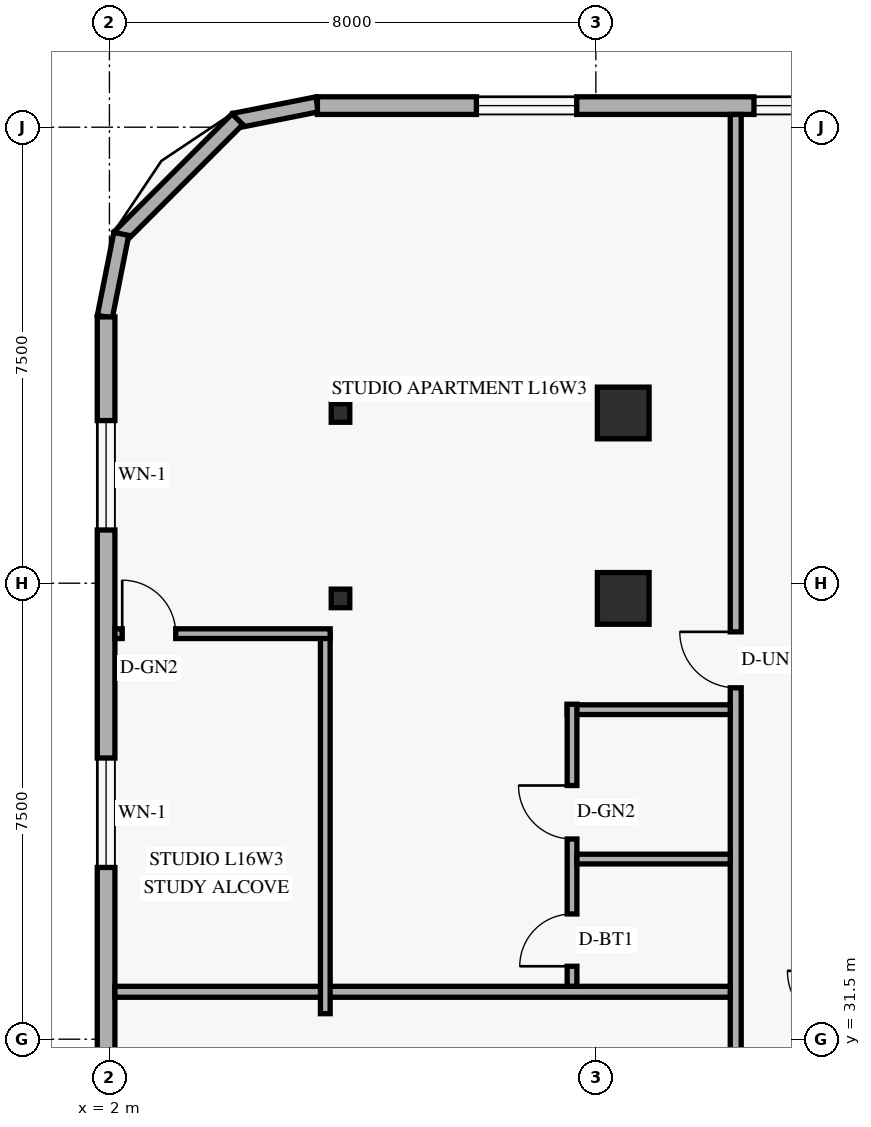
"""IFC4 building model, lengths in metres.
Left out: names, types, materials, properties, quantities, classifications, styles, units other than length and angle.
Written with IfcOpenShell. Run it as: python <this file> out.ifc"""

import sys

from ifc_helpers import new_model, si_unit, direction, frame, frame_2d, origin, origin_2d, place, context, subcontext, project, spatial, rectangle, hollow_rectangle, extrude, element, fill, save


model = new_model("IFC4")
c1 = context("Model", 3, precision=1e-05, world=origin(), true_north=direction((0.0, 1.0)))
c2 = subcontext(c1, "Body", "Model", "MODEL_VIEW")
j1 = project(units=[si_unit("LENGTHUNIT", "METRE"), si_unit("PLANEANGLEUNIT", "RADIAN")], contexts=[c1])
p1 = place(None, origin())
s1 = spatial("IfcSite", under=j1, at=p1, CompositionType="ELEMENT")
p2 = place(p1, origin())
s2 = spatial("IfcBuilding", under=s1, at=p2, CompositionType="ELEMENT")
p3 = place(p2, frame((0.0, 0.0, 64.2)))
s3 = spatial("IfcBuildingStorey", under=s2, at=p3, CompositionType="ELEMENT", Elevation=64.2)
for number, where, z_axis, x_axis in (
    (1, (5.8, 38.75, 0.0), (0.0, 0.0, 1.0), (1.0, 0.0, 0.0)),
    (2, (5.8, 41.8, 0.0), (0.0, 0.0, 1.0), (1.0, 0.0, 0.0)),
):
    element("IfcColumn", number, at=place(p3, frame(where, z_axis=z_axis, x_axis=x_axis)), inside=s3, PredefinedType="COLUMN", context=c2, shape_type="SweptSolid", body=[
        extrude(hollow_rectangle(XDim=0.305, YDim=0.305, WallThickness=0.013, at=origin_2d()), origin(), (0.0, 0.0, 1.0), 3.6),
    ])
for number, where, z_axis, x_axis in (
    (3, (10.45, 38.75, 0.0), (0.0, 0.0, 1.0), (1.0, 0.0, 0.0)),
    (4, (10.45, 41.8, 0.0), (0.0, 0.0, 1.0), (1.0, 0.0, 0.0)),
):
    element("IfcColumn", number, at=place(p3, frame(where, z_axis=z_axis, x_axis=x_axis)), inside=s3, PredefinedType="COLUMN", context=c2, shape_type="SweptSolid", body=[
        extrude(rectangle(XDim=0.85, YDim=0.85, at=origin_2d()), origin(), (0.0, 0.0, 1.0), 3.6),
    ])
p4 = place(p3, frame((5.417, 46.876, 0.0), z_axis=(0.0, 0.0, 1.0), x_axis=(-0.980809899341, -0.19496651342, 0.0)))
e5 = element("IfcWall", 5, at=p4, inside=s3, PredefinedType="SOLIDWALL", context=c2, shape_type="SweptSolid", body=[
    extrude(rectangle(XDim=1.389, YDim=0.25, at=frame_2d((0.694, 0.0))), origin(), (0.0, 0.0, 1.0), 3.36),
])
p5 = place(p3, frame((4.105, 46.632, 0.0), z_axis=(0.0, 0.0, 1.0), x_axis=(-0.707106781187, -0.707106781187, 0.0)))
e6 = element("IfcWall", 6, at=p5, inside=s3, PredefinedType="SOLIDWALL", context=c2, shape_type="SweptSolid", body=[
    extrude(rectangle(XDim=2.739, YDim=0.25, at=frame_2d((1.37, 0.0))), origin(), (0.0, 0.0, 1.0), 3.36),
])
p6 = place(p3, frame((2.195, 44.746, 0.0), z_axis=(0.0, 0.0, 1.0), x_axis=(-0.19496651342, -0.980809899341, 0.0)))
e7 = element("IfcWall", 7, at=p6, inside=s3, PredefinedType="SOLIDWALL", context=c2, shape_type="SweptSolid", body=[
    extrude(rectangle(XDim=1.389, YDim=0.25, at=frame_2d((0.694, 0.0))), origin(), (0.0, 0.0, 1.0), 3.36),
])
p7 = place(p3, frame((44.98, 46.855, 0.0), z_axis=(0.0, 0.0, 1.0), x_axis=(-1.0, 0.0, 0.0)))
e8 = element("IfcWall", 8, at=p7, inside=s3, PredefinedType="SOLIDWALL", context=c2, shape_type="SweptSolid", body=[
    extrude(rectangle(XDim=39.56, YDim=0.29, at=frame_2d((19.78, 0.0))), origin(), (0.0, 0.0, 1.0), 3.36),
])
p8 = place(p7, frame((35.295, 0.0, 0.85)))
e9 = element("IfcOpeningElement", 9, at=p8, cuts=e8, PredefinedType="OPENING", context=c2, shape_type="SweptSolid", body=[
    extrude(rectangle(XDim=1.65, YDim=1.6, at=frame_2d((0.825, 0.8))), frame((0.0, 0.155, 0.0), z_axis=(0.0, -1.0, 0.0), x_axis=(1.0, 0.0, 0.0)), (0.0, 0.0, 1.0), 0.31),
])
p9 = place(p7, frame((31.18, 0.0, 0.85)))
e10 = element("IfcOpeningElement", 10, at=p9, cuts=e8, PredefinedType="OPENING", context=c2, shape_type="SweptSolid", body=[
    extrude(rectangle(XDim=1.2, YDim=1.5, at=frame_2d((0.6, 0.75))), frame((0.0, 0.155, 0.0), z_axis=(0.0, -1.0, 0.0), x_axis=(1.0, 0.0, 0.0)), (0.0, 0.0, 1.0), 0.31),
])
p10 = place(p7, frame((25.684, 0.0, 0.85)))
e11 = element("IfcOpeningElement", 11, at=p10, cuts=e8, PredefinedType="OPENING", context=c2, shape_type="SweptSolid", body=[
    extrude(rectangle(XDim=1.65, YDim=1.6, at=frame_2d((0.825, 0.8))), frame((0.0, 0.155, 0.0), z_axis=(0.0, -1.0, 0.0), x_axis=(1.0, 0.0, 0.0)), (0.0, 0.0, 1.0), 0.31),
])
p11 = place(p7, frame((18.649, 0.0, 0.85)))
e12 = element("IfcOpeningElement", 12, at=p11, cuts=e8, PredefinedType="OPENING", context=c2, shape_type="SweptSolid", body=[
    extrude(rectangle(XDim=1.65, YDim=1.6, at=frame_2d((0.825, 0.8))), frame((0.0, 0.155, 0.0), z_axis=(0.0, -1.0, 0.0), x_axis=(1.0, 0.0, 0.0)), (0.0, 0.0, 1.0), 0.31),
])
p12 = place(p7, frame((12.359, 0.0, 0.85)))
e13 = element("IfcOpeningElement", 13, at=p12, cuts=e8, PredefinedType="OPENING", context=c2, shape_type="SweptSolid", body=[
    extrude(rectangle(XDim=1.65, YDim=1.6, at=frame_2d((0.825, 0.8))), frame((0.0, 0.155, 0.0), z_axis=(0.0, -1.0, 0.0), x_axis=(1.0, 0.0, 0.0)), (0.0, 0.0, 1.0), 0.31),
])
p13 = place(p7, frame((7.895, 0.0, 0.85)))
e14 = element("IfcOpeningElement", 14, at=p13, cuts=e8, PredefinedType="OPENING", context=c2, shape_type="SweptSolid", body=[
    extrude(rectangle(XDim=1.2, YDim=1.5, at=frame_2d((0.6, 0.75))), frame((0.0, 0.155, 0.0), z_axis=(0.0, -1.0, 0.0), x_axis=(1.0, 0.0, 0.0)), (0.0, 0.0, 1.0), 0.31),
])
p14 = place(p7, frame((2.89, 0.0, 0.85)))
e15 = element("IfcOpeningElement", 15, at=p14, cuts=e8, PredefinedType="OPENING", context=c2, shape_type="SweptSolid", body=[
    extrude(rectangle(XDim=1.65, YDim=1.6, at=frame_2d((0.825, 0.8))), frame((0.0, 0.155, 0.0), z_axis=(0.0, -1.0, 0.0), x_axis=(1.0, 0.0, 0.0)), (0.0, 0.0, 1.0), 0.31),
])
p15 = place(p3, frame((1.945, 43.38, 0.0), z_axis=(0.0, 0.0, 1.0), x_axis=(0.0, -1.0, 0.0)))
e16 = element("IfcWall", 16, at=p15, inside=s3, PredefinedType="SOLIDWALL", context=c2, shape_type="SweptSolid", body=[
    extrude(rectangle(XDim=38.76, YDim=0.29, at=frame_2d((19.38, 0.0))), origin(), (0.0, 0.0, 1.0), 3.36),
])
p16 = place(p15, frame((31.85, 0.0, 0.85)))
e17 = element("IfcOpeningElement", 17, at=p16, cuts=e16, PredefinedType="OPENING", context=c2, shape_type="SweptSolid", body=[
    extrude(rectangle(XDim=1.8, YDim=1.6, at=frame_2d((0.9, 0.8))), frame((0.0, 0.155, 0.0), z_axis=(0.0, -1.0, 0.0), x_axis=(1.0, 0.0, 0.0)), (0.0, 0.0, 1.0), 0.31),
])
p17 = place(p15, frame((22.895, 0.0, 0.85)))
e18 = element("IfcOpeningElement", 18, at=p17, cuts=e16, PredefinedType="OPENING", context=c2, shape_type="SweptSolid", body=[
    extrude(rectangle(XDim=1.8, YDim=1.6, at=frame_2d((0.9, 0.8))), frame((0.0, 0.155, 0.0), z_axis=(0.0, -1.0, 0.0), x_axis=(1.0, 0.0, 0.0)), (0.0, 0.0, 1.0), 0.31),
])
p18 = place(p15, frame((15.075, 0.0, 0.85)))
e19 = element("IfcOpeningElement", 19, at=p18, cuts=e16, PredefinedType="OPENING", context=c2, shape_type="SweptSolid", body=[
    extrude(rectangle(XDim=1.8, YDim=1.6, at=frame_2d((0.9, 0.8))), frame((0.0, 0.155, 0.0), z_axis=(0.0, -1.0, 0.0), x_axis=(1.0, 0.0, 0.0)), (0.0, 0.0, 1.0), 0.31),
])
p19 = place(p15, frame((7.255, 0.0, 0.85)))
e20 = element("IfcOpeningElement", 20, at=p19, cuts=e16, PredefinedType="OPENING", context=c2, shape_type="SweptSolid", body=[
    extrude(rectangle(XDim=1.8, YDim=1.6, at=frame_2d((0.9, 0.8))), frame((0.0, 0.155, 0.0), z_axis=(0.0, -1.0, 0.0), x_axis=(1.0, 0.0, 0.0)), (0.0, 0.0, 1.0), 0.31),
])
p20 = place(p15, frame((1.705, 0.0, 0.85)))
e21 = element("IfcOpeningElement", 21, at=p20, cuts=e16, PredefinedType="OPENING", context=c2, shape_type="SweptSolid", body=[
    extrude(rectangle(XDim=1.8, YDim=1.6, at=frame_2d((0.9, 0.8))), frame((0.0, 0.155, 0.0), z_axis=(0.0, -1.0, 0.0), x_axis=(1.0, 0.0, 0.0)), (0.0, 0.0, 1.0), 0.31),
])
p21 = place(p3, frame((12.3, 1.29, 0.0), z_axis=(0.0, 0.0, 1.0), x_axis=(0.0, 1.0, 0.0)))
e22 = element("IfcWall", 22, at=p21, inside=s3, PredefinedType="STANDARD", context=c2, shape_type="SweptSolid", body=[
    extrude(rectangle(XDim=45.42, YDim=0.18, at=frame_2d((22.71, 0.0))), origin(), (0.0, 0.0, 1.0), 2.649),
])
p22 = place(p21, frame((9.41, 0.0, 0.0)))
e23 = element("IfcOpeningElement", 23, at=p22, cuts=e22, PredefinedType="OPENING", context=c2, shape_type="SweptSolid", body=[
    extrude(rectangle(XDim=0.92, YDim=2.15, at=frame_2d((0.46, 1.075))), frame((0.0, 0.1, 0.0), z_axis=(0.0, -1.0, 0.0), x_axis=(1.0, 0.0, 0.0)), (0.0, 0.0, 1.0), 0.2),
])
p23 = place(p21, frame((20.35, 0.0, 0.0)))
e24 = element("IfcOpeningElement", 24, at=p23, cuts=e22, PredefinedType="OPENING", context=c2, shape_type="SweptSolid", body=[
    extrude(rectangle(XDim=0.92, YDim=2.15, at=frame_2d((0.46, 1.075))), frame((0.0, 0.1, 0.0), z_axis=(0.0, -1.0, 0.0), x_axis=(1.0, 0.0, 0.0)), (0.0, 0.0, 1.0), 0.2),
])
p24 = place(p21, frame((35.99, 0.0, 0.0)))
e25 = element("IfcOpeningElement", 25, at=p24, cuts=e22, PredefinedType="OPENING", context=c2, shape_type="SweptSolid", body=[
    extrude(rectangle(XDim=0.92, YDim=2.15, at=frame_2d((0.46, 1.075))), frame((0.0, 0.1, 0.0), z_axis=(0.0, -1.0, 0.0), x_axis=(1.0, 0.0, 0.0)), (0.0, 0.0, 1.0), 0.2),
])
p25 = place(p3, frame((2.09, 32.28, 0.0), z_axis=(0.0, 0.0, 1.0), x_axis=(1.0, 0.0, 0.0)))
e26 = element("IfcWall", 26, at=p25, inside=s3, PredefinedType="PARTITIONING", context=c2, shape_type="SweptSolid", body=[
    extrude(rectangle(XDim=10.12, YDim=0.18, at=frame_2d((5.06, 0.0))), origin(), (0.0, 0.0, 1.0), 2.649),
])
p26 = place(p3, frame((9.528, 36.92, 0.0), z_axis=(0.0, 0.0, 1.0), x_axis=(1.0, 0.0, 0.0)))
e27 = element("IfcWall", 27, at=p26, inside=s3, PredefinedType="PLUMBINGWALL", context=c2, shape_type="SweptSolid", body=[
    extrude(rectangle(XDim=2.682, YDim=0.16, at=frame_2d((1.341, 0.0))), origin(), (0.0, 0.0, 1.0), 2.649),
])
p27 = place(p3, frame((9.608, 32.37, 0.0), z_axis=(0.0, 0.0, 1.0), x_axis=(0.0, 1.0, 0.0)))
e28 = element("IfcWall", 28, at=p27, inside=s3, PredefinedType="PLUMBINGWALL", context=c2, shape_type="SweptSolid", body=[
    extrude(rectangle(XDim=4.64, YDim=0.16, at=frame_2d((2.32, 0.0))), origin(), (0.0, 0.0, 1.0), 2.932),
])
p28 = place(p27, frame((0.33, 0.0, 0.0)))
e29 = element("IfcOpeningElement", 29, at=p28, cuts=e28, PredefinedType="OPENING", context=c2, shape_type="SweptSolid", body=[
    extrude(rectangle(XDim=0.86, YDim=2.12, at=frame_2d((0.43, 1.06))), frame((0.0, 0.09, 0.0), z_axis=(0.0, -1.0, 0.0), x_axis=(1.0, 0.0, 0.0)), (0.0, 0.0, 1.0), 0.18),
])
p29 = place(p27, frame((2.423, 0.0, 0.0)))
e30 = element("IfcOpeningElement", 30, at=p29, cuts=e28, PredefinedType="OPENING", context=c2, shape_type="SweptSolid", body=[
    extrude(rectangle(XDim=0.88, YDim=2.12, at=frame_2d((0.44, 1.06))), frame((0.0, 0.09, 0.0), z_axis=(0.0, -1.0, 0.0), x_axis=(1.0, 0.0, 0.0)), (0.0, 0.0, 1.0), 0.18),
])
p30 = place(p3, frame((9.688, 34.463, 0.0), z_axis=(0.0, 0.0, 1.0), x_axis=(1.0, 0.0, 0.0)))
e31 = element("IfcWall", 31, at=p30, inside=s3, PredefinedType="PLUMBINGWALL", context=c2, shape_type="SweptSolid", body=[
    extrude(rectangle(XDim=2.522, YDim=0.16, at=frame_2d((1.261, 0.0))), origin(), (0.0, 0.0, 1.0), 2.649),
])
p31 = place(p3, frame((5.55, 31.92, 0.0), z_axis=(0.0, 0.0, 1.0), x_axis=(0.0, 1.0, 0.0)))
e32 = element("IfcWall", 32, at=p31, inside=s3, PredefinedType="PARTITIONING", context=c2, shape_type="SweptSolid", body=[
    extrude(rectangle(XDim=6.25, YDim=0.16, at=frame_2d((3.125, 0.0))), origin(), (0.0, 0.0, 1.0), 3.36),
])
p32 = place(p3, frame((2.09, 38.17, 0.0), z_axis=(0.0, 0.0, 1.0), x_axis=(1.0, 0.0, 0.0)))
e33 = element("IfcWall", 33, at=p32, inside=s3, PredefinedType="PARTITIONING", context=c2, shape_type="SweptSolid", body=[
    extrude(rectangle(XDim=3.54, YDim=0.16, at=frame_2d((1.77, 0.0))), origin(), (0.0, 0.0, 1.0), 3.36),
])
p33 = place(p32, frame((0.12, 0.0, 0.0)))
e34 = element("IfcOpeningElement", 34, at=p33, cuts=e33, PredefinedType="OPENING", context=c2, shape_type="SweptSolid", body=[
    extrude(rectangle(XDim=0.88, YDim=2.12, at=frame_2d((0.44, 1.06))), frame((0.0, 0.09, 0.0), z_axis=(0.0, -1.0, 0.0), x_axis=(1.0, 0.0, 0.0)), (0.0, 0.0, 1.0), 0.18),
])
p34 = place(p8, origin())
e35 = element("IfcWindow", 35, at=p34, inside=s3, PartitioningType="SINGLE_PANEL", PredefinedType="WINDOW", context=c2, shape_type="SweptSolid", body=[
    extrude(rectangle(XDim=1.65, YDim=1.6, at=frame_2d((0.825, 0.8))), frame((0.0, 0.03, 0.0), z_axis=(0.0, -1.0, 0.0), x_axis=(1.0, 0.0, 0.0)), (0.0, 0.0, 1.0), 0.06),
])
fill(e9, e35)
p35 = place(p9, origin())
e36 = element("IfcWindow", 36, at=p35, inside=s3, PartitioningType="SINGLE_PANEL", PredefinedType="WINDOW", context=c2, shape_type="SweptSolid", body=[
    extrude(rectangle(XDim=1.2, YDim=1.5, at=frame_2d((0.6, 0.75))), frame((0.0, 0.03, 0.0), z_axis=(0.0, -1.0, 0.0), x_axis=(1.0, 0.0, 0.0)), (0.0, 0.0, 1.0), 0.06),
])
fill(e10, e36)
p36 = place(p19, origin())
e37 = element("IfcWindow", 37, at=p36, inside=s3, PartitioningType="SINGLE_PANEL", PredefinedType="WINDOW", context=c2, shape_type="SweptSolid", body=[
    extrude(rectangle(XDim=1.8, YDim=1.6, at=frame_2d((0.9, 0.8))), frame((0.0, 0.03, 0.0), z_axis=(0.0, -1.0, 0.0), x_axis=(1.0, 0.0, 0.0)), (0.0, 0.0, 1.0), 0.06),
])
fill(e20, e37)
p37 = place(p20, origin())
e38 = element("IfcWindow", 38, at=p37, inside=s3, PartitioningType="SINGLE_PANEL", PredefinedType="WINDOW", context=c2, shape_type="SweptSolid", body=[
    extrude(rectangle(XDim=1.8, YDim=1.6, at=frame_2d((0.9, 0.8))), frame((0.0, 0.03, 0.0), z_axis=(0.0, -1.0, 0.0), x_axis=(1.0, 0.0, 0.0)), (0.0, 0.0, 1.0), 0.06),
])
fill(e21, e38)
p38 = place(p33, origin())
e39 = element("IfcDoor", 39, at=p38, inside=s3, OperationType="SINGLE_SWING_LEFT", PredefinedType="DOOR", context=c2, shape_type="SweptSolid", body=[
    extrude(rectangle(XDim=0.88, YDim=2.12, at=frame_2d((0.44, 1.06))), frame((0.0, 0.025, 0.0), z_axis=(0.0, -1.0, 0.0), x_axis=(1.0, 0.0, 0.0)), (0.0, 0.0, 1.0), 0.05),
])
fill(e34, e39)
p39 = place(p24, origin())
e40 = element("IfcDoor", 40, at=p39, inside=s3, OperationType="SINGLE_SWING_RIGHT", PredefinedType="DOOR", context=c2, shape_type="SweptSolid", body=[
    extrude(rectangle(XDim=0.92, YDim=2.15, at=frame_2d((0.46, 1.075))), frame((0.0, 0.025, 0.0), z_axis=(0.0, -1.0, 0.0), x_axis=(1.0, 0.0, 0.0)), (0.0, 0.0, 1.0), 0.05),
])
fill(e25, e40)
p40 = place(p28, origin())
e41 = element("IfcDoor", 41, at=p40, inside=s3, OperationType="SINGLE_SWING_LEFT", PredefinedType="DOOR", context=c2, shape_type="SweptSolid", body=[
    extrude(rectangle(XDim=0.86, YDim=2.12, at=frame_2d((0.43, 1.06))), frame((0.0, 0.025, 0.0), z_axis=(0.0, -1.0, 0.0), x_axis=(1.0, 0.0, 0.0)), (0.0, 0.0, 1.0), 0.05),
])
fill(e29, e41)
p41 = place(p29, origin())
e42 = element("IfcDoor", 42, at=p41, inside=s3, OperationType="SINGLE_SWING_RIGHT", PredefinedType="DOOR", context=c2, shape_type="SweptSolid", body=[
    extrude(rectangle(XDim=0.88, YDim=2.12, at=frame_2d((0.44, 1.06))), frame((0.0, 0.025, 0.0), z_axis=(0.0, -1.0, 0.0), x_axis=(1.0, 0.0, 0.0)), (0.0, 0.0, 1.0), 0.05),
])
fill(e30, e42)
save(model, sys.argv[1])
